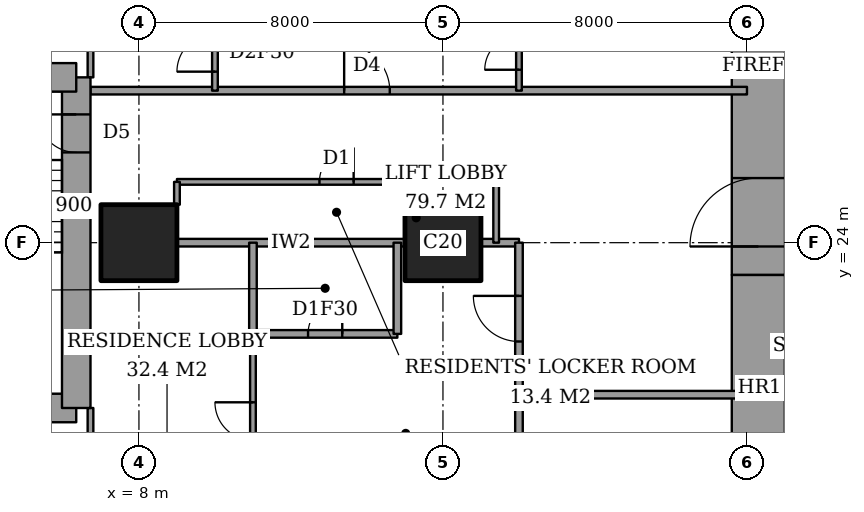
"""IFC4 building model, lengths in metres.
Left out: names, types, materials, properties, quantities, classifications, styles, units other than length and angle.
Written with IfcOpenShell. Run it as: python <this file> out.ifc"""

import sys

from ifc_helpers import new_model, si_unit, direction, frame, frame_2d, origin, origin_2d, place, context, subcontext, project, spatial, rectangle, extrude, element, fill, save


model = new_model("IFC4")
c1 = context("Model", 3, precision=1e-05, world=origin(), true_north=direction((0.0, 1.0)))
c2 = subcontext(c1, "Body", "Model", "MODEL_VIEW")
j1 = project(units=[si_unit("LENGTHUNIT", "METRE"), si_unit("PLANEANGLEUNIT", "RADIAN")], contexts=[c1])
p1 = place(None, origin())
s1 = spatial("IfcSite", under=j1, at=p1, CompositionType="ELEMENT")
p2 = place(p1, origin())
s2 = spatial("IfcBuilding", under=s1, at=p2, CompositionType="ELEMENT")
p3 = place(p2, frame((0.0, 0.0, 103.4)))
s3 = spatial("IfcBuildingStorey", under=s2, at=p3, CompositionType="ELEMENT", Elevation=103.4)
for number, where, z_axis, x_axis in (
    (1, (8.0, 24.0, 0.0), (0.0, 0.0, 1.0), (1.0, 0.0, 0.0)),
    (2, (16.0, 24.0, 0.0), (0.0, 0.0, 1.0), (1.0, 0.0, 0.0)),
):
    element("IfcColumn", number, at=place(p3, frame(where, z_axis=z_axis, x_axis=x_axis)), inside=s3, PredefinedType="COLUMN", context=c2, shape_type="SweptSolid", body=[
        extrude(rectangle(XDim=2.0, YDim=2.0, at=origin_2d()), origin(), (0.0, 0.0, 1.0), 3.6),
    ])
p4 = place(p3, frame((24.3, 13.0, 0.0), z_axis=(0.0, 0.0, 1.0), x_axis=(0.0, 1.0, 0.0)))
e3 = element("IfcWall", 3, at=p4, inside=s3, PredefinedType="SHEAR", context=c2, shape_type="SweptSolid", body=[
    extrude(rectangle(XDim=10.15, YDim=1.4, at=frame_2d((5.075, 0.0))), origin(), (0.0, 0.0, 1.0), 3.6),
])
p5 = place(p3, frame((24.3, 23.15, 0.0), z_axis=(0.0, 0.0, 1.0), x_axis=(0.0, 1.0, 0.0)))
e4 = element("IfcWall", 4, at=p5, inside=s3, PredefinedType="SHEAR", context=c2, shape_type="SweptSolid", body=[
    extrude(rectangle(XDim=11.85, YDim=1.4, at=frame_2d((5.925, 0.0))), origin(), (0.0, 0.0, 1.0), 3.6),
])
p6 = place(p5, frame((0.75, 0.0, 0.0)))
e5 = element("IfcOpeningElement", 5, at=p6, cuts=e4, PredefinedType="OPENING", context=c2, shape_type="SweptSolid", body=[
    extrude(rectangle(XDim=1.8, YDim=2.4, at=frame_2d((0.9, 1.2))), frame((0.0, 0.71, 0.0), z_axis=(0.0, -1.0, 0.0), x_axis=(1.0, 0.0, 0.0)), (0.0, 0.0, 1.0), 1.42),
])
p7 = place(p3, frame((1.9, 19.65, 0.0), z_axis=(0.0, 0.0, 1.0), x_axis=(1.0, 0.0, 0.0)))
e6 = element("IfcWall", 6, at=p7, inside=s3, PredefinedType="SHEAR", context=c2, shape_type="SweptSolid", body=[
    extrude(rectangle(XDim=4.45, YDim=0.75, at=frame_2d((2.225, 0.0))), origin(), (0.0, 0.0, 1.0), 3.6),
])
p8 = place(p3, frame((6.35, 19.65, 0.0), z_axis=(0.0, 0.0, 1.0), x_axis=(0.0, 1.0, 0.0)))
e7 = element("IfcWall", 7, at=p8, inside=s3, PredefinedType="SHEAR", context=c2, shape_type="SweptSolid", body=[
    extrude(rectangle(XDim=8.7, YDim=0.75, at=frame_2d((4.35, 0.0))), origin(), (0.0, 0.0, 1.0), 3.6),
])
p9 = place(p8, frame((6.725, 0.0, 0.0)))
e8 = element("IfcOpeningElement", 8, at=p9, cuts=e7, PredefinedType="OPENING", context=c2, shape_type="SweptSolid", body=[
    extrude(rectangle(XDim=1.0, YDim=2.1, at=frame_2d((0.5, 1.05))), frame((0.0, 0.385, 0.0), z_axis=(0.0, -1.0, 0.0), x_axis=(1.0, 0.0, 0.0)), (0.0, 0.0, 1.0), 0.77),
])
p10 = place(p3, frame((6.35, 28.35, 0.0), z_axis=(0.0, 0.0, 1.0), x_axis=(-1.0, 0.0, 0.0)))
e9 = element("IfcWall", 9, at=p10, inside=s3, PredefinedType="SHEAR", context=c2, shape_type="SweptSolid", body=[
    extrude(rectangle(XDim=4.45, YDim=0.75, at=frame_2d((2.225, 0.0))), origin(), (0.0, 0.0, 1.0), 3.6),
])
p11 = place(p3, frame((18.0, 20.0, 0.0), z_axis=(0.0, 0.0, 1.0), x_axis=(1.0, 0.0, 0.0)))
e10 = element("IfcWall", 10, at=p11, inside=s3, PredefinedType="PARTITIONING", context=c2, shape_type="SweptSolid", body=[
    extrude(rectangle(XDim=6.0, YDim=0.2, at=frame_2d((3.0, 0.0))), origin(), (0.0, 0.0, 1.0), 3.35),
])
p12 = place(p3, frame((11.0, 21.6, 0.0), z_axis=(0.0, 0.0, 1.0), x_axis=(1.0, 0.0, 0.0)))
e11 = element("IfcWall", 11, at=p12, inside=s3, PredefinedType="PARTITIONING", context=c2, shape_type="SweptSolid", body=[
    extrude(rectangle(XDim=3.8, YDim=0.2, at=frame_2d((1.9, 0.0))), origin(), (0.0, 0.0, 1.0), 3.35),
])
p13 = place(p12, frame((1.45, 0.0, 0.0)))
e12 = element("IfcOpeningElement", 12, at=p13, cuts=e11, PredefinedType="OPENING", context=c2, shape_type="SweptSolid", body=[
    extrude(rectangle(XDim=0.9, YDim=2.1, at=frame_2d((0.45, 1.05))), frame((0.0, 0.11, 0.0), z_axis=(0.0, -1.0, 0.0), x_axis=(1.0, 0.0, 0.0)), (0.0, 0.0, 1.0), 0.22),
])
p14 = place(p3, frame((9.0, 24.0, 0.0), z_axis=(0.0, 0.0, 1.0), x_axis=(1.0, 0.0, 0.0)))
e13 = element("IfcWall", 13, at=p14, inside=s3, PredefinedType="PARTITIONING", context=c2, shape_type="SweptSolid", body=[
    extrude(rectangle(XDim=6.0, YDim=0.2, at=frame_2d((3.0, 0.0))), origin(), (0.0, 0.0, 1.0), 3.35),
])
p15 = place(p3, frame((17.0, 24.0, 0.0), z_axis=(0.0, 0.0, 1.0), x_axis=(1.0, 0.0, 0.0)))
e14 = element("IfcWall", 14, at=p15, inside=s3, PredefinedType="PARTITIONING", context=c2, shape_type="SweptSolid", body=[
    extrude(rectangle(XDim=1.0, YDim=0.2, at=frame_2d((0.5, 0.0))), origin(), (0.0, 0.0, 1.0), 3.35),
])
p16 = place(p3, frame((9.0, 25.6, 0.0), z_axis=(0.0, 0.0, 1.0), x_axis=(1.0, 0.0, 0.0)))
e15 = element("IfcWall", 15, at=p16, inside=s3, PredefinedType="PARTITIONING", context=c2, shape_type="SweptSolid", body=[
    extrude(rectangle(XDim=8.4, YDim=0.15, at=frame_2d((4.2, 0.0))), origin(), (0.0, 0.0, 1.0), 3.35),
])
p17 = place(p16, frame((3.75, 0.0, 0.0)))
e16 = element("IfcOpeningElement", 16, at=p17, cuts=e15, PredefinedType="OPENING", context=c2, shape_type="SweptSolid", body=[
    extrude(rectangle(XDim=0.9, YDim=2.1, at=frame_2d((0.45, 1.05))), frame((0.0, 0.085, 0.0), z_axis=(0.0, -1.0, 0.0), x_axis=(1.0, 0.0, 0.0)), (0.0, 0.0, 1.0), 0.17),
])
p18 = place(p3, frame((6.725, 28.0, 0.0), z_axis=(0.0, 0.0, 1.0), x_axis=(1.0, 0.0, 0.0)))
e17 = element("IfcWall", 17, at=p18, inside=s3, PredefinedType="PARTITIONING", context=c2, shape_type="SweptSolid", body=[
    extrude(rectangle(XDim=17.275, YDim=0.2, at=frame_2d((8.637, 0.0))), origin(), (0.0, 0.0, 1.0), 3.35),
])
p19 = place(p18, frame((6.675, 0.0, 0.0)))
e18 = element("IfcOpeningElement", 18, at=p19, cuts=e17, PredefinedType="OPENING", context=c2, shape_type="SweptSolid", body=[
    extrude(rectangle(XDim=1.2, YDim=2.4, at=frame_2d((0.6, 1.2))), frame((0.0, 0.11, 0.0), z_axis=(0.0, -1.0, 0.0), x_axis=(1.0, 0.0, 0.0)), (0.0, 0.0, 1.0), 0.22),
])
p20 = place(p3, frame((6.725, 17.2, 0.0), z_axis=(0.0, 0.0, 1.0), x_axis=(0.0, 1.0, 0.0)))
e19 = element("IfcWall", 19, at=p20, inside=s3, PredefinedType="PARTITIONING", context=c2, shape_type="SweptSolid", body=[
    extrude(rectangle(XDim=2.45, YDim=0.15, at=frame_2d((1.225, 0.0))), origin(), (0.0, 0.0, 1.0), 3.35),
])
p21 = place(p20, frame((0.587, 0.0, 0.0)))
e20 = element("IfcOpeningElement", 20, at=p21, cuts=e19, PredefinedType="OPENING", context=c2, shape_type="SweptSolid", body=[
    extrude(rectangle(XDim=0.9, YDim=2.1, at=frame_2d((0.45, 1.05))), frame((0.0, 0.085, 0.0), z_axis=(0.0, -1.0, 0.0), x_axis=(1.0, 0.0, 0.0)), (0.0, 0.0, 1.0), 0.17),
])
p22 = place(p3, frame((6.725, 28.35, 0.0), z_axis=(0.0, 0.0, 1.0), x_axis=(0.0, 1.0, 0.0)))
e21 = element("IfcWall", 21, at=p22, inside=s3, PredefinedType="PARTITIONING", context=c2, shape_type="SweptSolid", body=[
    extrude(rectangle(XDim=2.45, YDim=0.15, at=frame_2d((1.225, 0.0))), origin(), (0.0, 0.0, 1.0), 3.35),
])
p23 = place(p22, frame((0.913, 0.0, 0.0)))
e22 = element("IfcOpeningElement", 22, at=p23, cuts=e21, PredefinedType="OPENING", context=c2, shape_type="SweptSolid", body=[
    extrude(rectangle(XDim=1.0, YDim=2.1, at=frame_2d((0.5, 1.05))), frame((0.0, 0.085, 0.0), z_axis=(0.0, -1.0, 0.0), x_axis=(1.0, 0.0, 0.0)), (0.0, 0.0, 1.0), 0.17),
])
p24 = place(p3, frame((9.0, 25.0, 0.0), z_axis=(0.0, 0.0, 1.0), x_axis=(0.0, 1.0, 0.0)))
e23 = element("IfcWall", 23, at=p24, inside=s3, PredefinedType="PARTITIONING", context=c2, shape_type="SweptSolid", body=[
    extrude(rectangle(XDim=0.6, YDim=0.15, at=frame_2d((0.3, 0.0))), origin(), (0.0, 0.0, 1.0), 3.35),
])
p25 = place(p3, frame((10.0, 28.0, 0.0), z_axis=(0.0, 0.0, 1.0), x_axis=(0.0, 1.0, 0.0)))
e24 = element("IfcWall", 24, at=p25, inside=s3, PredefinedType="PARTITIONING", context=c2, shape_type="SweptSolid", body=[
    extrude(rectangle(XDim=9.4, YDim=0.15, at=frame_2d((4.7, 0.0))), origin(), (0.0, 0.0, 1.0), 3.35),
])
p26 = place(p25, frame((0.5, 0.0, 0.0)))
e25 = element("IfcOpeningElement", 25, at=p26, cuts=e24, PredefinedType="OPENING", context=c2, shape_type="SweptSolid", body=[
    extrude(rectangle(XDim=1.0, YDim=2.1, at=frame_2d((0.5, 1.05))), frame((0.0, 0.085, 0.0), z_axis=(0.0, -1.0, 0.0), x_axis=(1.0, 0.0, 0.0)), (0.0, 0.0, 1.0), 0.17),
])
p27 = place(p3, frame((11.0, 21.6, 0.0), z_axis=(0.0, 0.0, 1.0), x_axis=(0.0, 1.0, 0.0)))
e26 = element("IfcWall", 26, at=p27, inside=s3, PredefinedType="PARTITIONING", context=c2, shape_type="SweptSolid", body=[
    extrude(rectangle(XDim=2.4, YDim=0.2, at=frame_2d((1.2, 0.0))), origin(), (0.0, 0.0, 1.0), 3.35),
])
p28 = place(p3, frame((11.0, 10.8, 0.0), z_axis=(0.0, 0.0, 1.0), x_axis=(0.0, 1.0, 0.0)))
e27 = element("IfcWall", 27, at=p28, inside=s3, PredefinedType="PARTITIONING", context=c2, shape_type="SweptSolid", body=[
    extrude(rectangle(XDim=10.8, YDim=0.15, at=frame_2d((5.4, 0.0))), origin(), (0.0, 0.0, 1.0), 3.35),
])
p29 = place(p28, frame((8.0, 0.0, 0.0)))
e28 = element("IfcOpeningElement", 28, at=p29, cuts=e27, PredefinedType="OPENING", context=c2, shape_type="SweptSolid", body=[
    extrude(rectangle(XDim=1.0, YDim=2.1, at=frame_2d((0.5, 1.05))), frame((0.0, 0.085, 0.0), z_axis=(0.0, -1.0, 0.0), x_axis=(1.0, 0.0, 0.0)), (0.0, 0.0, 1.0), 0.17),
])
p30 = place(p3, frame((14.8, 21.6, 0.0), z_axis=(0.0, 0.0, 1.0), x_axis=(0.0, 1.0, 0.0)))
e29 = element("IfcWall", 29, at=p30, inside=s3, PredefinedType="PARTITIONING", context=c2, shape_type="SweptSolid", body=[
    extrude(rectangle(XDim=2.4, YDim=0.2, at=frame_2d((1.2, 0.0))), origin(), (0.0, 0.0, 1.0), 3.35),
])
p31 = place(p3, frame((17.4, 24.0, 0.0), z_axis=(0.0, 0.0, 1.0), x_axis=(0.0, 1.0, 0.0)))
e30 = element("IfcWall", 30, at=p31, inside=s3, PredefinedType="PARTITIONING", context=c2, shape_type="SweptSolid", body=[
    extrude(rectangle(XDim=1.6, YDim=0.15, at=frame_2d((0.8, 0.0))), origin(), (0.0, 0.0, 1.0), 3.35),
])
p32 = place(p3, frame((18.0, 17.0, 0.0), z_axis=(0.0, 0.0, 1.0), x_axis=(0.0, 1.0, 0.0)))
e31 = element("IfcWall", 31, at=p32, inside=s3, PredefinedType="PARTITIONING", context=c2, shape_type="SweptSolid", body=[
    extrude(rectangle(XDim=7.0, YDim=0.2, at=frame_2d((3.5, 0.0))), origin(), (0.0, 0.0, 1.0), 3.35),
])
p33 = place(p32, frame((4.4, 0.0, 0.0)))
e32 = element("IfcOpeningElement", 32, at=p33, cuts=e31, PredefinedType="OPENING", context=c2, shape_type="SweptSolid", body=[
    extrude(rectangle(XDim=1.2, YDim=2.4, at=frame_2d((0.6, 1.2))), frame((0.0, 0.11, 0.0), z_axis=(0.0, -1.0, 0.0), x_axis=(1.0, 0.0, 0.0)), (0.0, 0.0, 1.0), 0.22),
])
p34 = place(p32, frame((1.05, 0.0, 0.0)))
e33 = element("IfcOpeningElement", 33, at=p34, cuts=e31, PredefinedType="OPENING", context=c2, shape_type="SweptSolid", body=[
    extrude(rectangle(XDim=0.9, YDim=2.1, at=frame_2d((0.45, 1.05))), frame((0.0, 0.11, 0.0), z_axis=(0.0, -1.0, 0.0), x_axis=(1.0, 0.0, 0.0)), (0.0, 0.0, 1.0), 0.22),
])
p35 = place(p3, frame((18.0, 28.0, 0.0), z_axis=(0.0, 0.0, 1.0), x_axis=(0.0, 1.0, 0.0)))
e34 = element("IfcWall", 34, at=p35, inside=s3, PredefinedType="PARTITIONING", context=c2, shape_type="SweptSolid", body=[
    extrude(rectangle(XDim=9.4, YDim=0.15, at=frame_2d((4.7, 0.0))), origin(), (0.0, 0.0, 1.0), 3.35),
])
p36 = place(p35, frame((0.55, 0.0, 0.0)))
e35 = element("IfcOpeningElement", 35, at=p36, cuts=e34, PredefinedType="OPENING", context=c2, shape_type="SweptSolid", body=[
    extrude(rectangle(XDim=0.9, YDim=2.1, at=frame_2d((0.45, 1.05))), frame((0.0, 0.085, 0.0), z_axis=(0.0, -1.0, 0.0), x_axis=(1.0, 0.0, 0.0)), (0.0, 0.0, 1.0), 0.17),
])
p37 = place(p29, origin())
e36 = element("IfcDoor", 36, at=p37, inside=s3, OperationType="SINGLE_SWING_LEFT", PredefinedType="DOOR", context=c2, shape_type="SweptSolid", body=[
    extrude(rectangle(XDim=1.0, YDim=2.1, at=frame_2d((0.5, 1.05))), frame((0.0, 0.025, 0.0), z_axis=(0.0, -1.0, 0.0), x_axis=(1.0, 0.0, 0.0)), (0.0, 0.0, 1.0), 0.05),
])
fill(e28, e36)
p38 = place(p13, origin())
e37 = element("IfcDoor", 37, at=p38, inside=s3, OperationType="SINGLE_SWING_LEFT", PredefinedType="DOOR", context=c2, shape_type="SweptSolid", body=[
    extrude(rectangle(XDim=0.9, YDim=2.1, at=frame_2d((0.45, 1.05))), frame((0.0, 0.025, 0.0), z_axis=(0.0, -1.0, 0.0), x_axis=(1.0, 0.0, 0.0)), (0.0, 0.0, 1.0), 0.05),
])
fill(e12, e37)
p39 = place(p33, origin())
e38 = element("IfcDoor", 38, at=p39, inside=s3, OperationType="SINGLE_SWING_LEFT", PredefinedType="DOOR", context=c2, shape_type="SweptSolid", body=[
    extrude(rectangle(XDim=1.2, YDim=2.4, at=frame_2d((0.6, 1.2))), frame((0.0, 0.025, 0.0), z_axis=(0.0, -1.0, 0.0), x_axis=(1.0, 0.0, 0.0)), (0.0, 0.0, 1.0), 0.05),
])
fill(e32, e38)
p40 = place(p26, origin())
e39 = element("IfcDoor", 39, at=p40, inside=s3, OperationType="SINGLE_SWING_RIGHT", PredefinedType="DOOR", context=c2, shape_type="SweptSolid", body=[
    extrude(rectangle(XDim=1.0, YDim=2.1, at=frame_2d((0.5, 1.05))), frame((0.0, 0.025, 0.0), z_axis=(0.0, -1.0, 0.0), x_axis=(1.0, 0.0, 0.0)), (0.0, 0.0, 1.0), 0.05),
])
fill(e25, e39)
p41 = place(p19, origin())
e40 = element("IfcDoor", 40, at=p41, inside=s3, OperationType="SINGLE_SWING_RIGHT", PredefinedType="DOOR", context=c2, shape_type="SweptSolid", body=[
    extrude(rectangle(XDim=1.2, YDim=2.4, at=frame_2d((0.6, 1.2))), frame((0.0, 0.025, 0.0), z_axis=(0.0, -1.0, 0.0), x_axis=(1.0, 0.0, 0.0)), (0.0, 0.0, 1.0), 0.05),
])
fill(e18, e40)
p42 = place(p36, origin())
e41 = element("IfcDoor", 41, at=p42, inside=s3, OperationType="SINGLE_SWING_RIGHT", PredefinedType="DOOR", context=c2, shape_type="SweptSolid", body=[
    extrude(rectangle(XDim=0.9, YDim=2.1, at=frame_2d((0.45, 1.05))), frame((0.0, 0.025, 0.0), z_axis=(0.0, -1.0, 0.0), x_axis=(1.0, 0.0, 0.0)), (0.0, 0.0, 1.0), 0.05),
])
fill(e35, e41)
p43 = place(p17, origin())
e42 = element("IfcDoor", 42, at=p43, inside=s3, OperationType="SINGLE_SWING_LEFT", PredefinedType="DOOR", context=c2, shape_type="SweptSolid", body=[
    extrude(rectangle(XDim=0.9, YDim=2.1, at=frame_2d((0.45, 1.05))), frame((0.0, 0.025, 0.0), z_axis=(0.0, -1.0, 0.0), x_axis=(1.0, 0.0, 0.0)), (0.0, 0.0, 1.0), 0.05),
])
fill(e16, e42)
p44 = place(p6, origin())
e43 = element("IfcDoor", 43, at=p44, inside=s3, OperationType="DOUBLE_DOOR_DOUBLE_SWING", PredefinedType="DOOR", context=c2, shape_type="SweptSolid", body=[
    extrude(rectangle(XDim=1.8, YDim=2.4, at=frame_2d((0.9, 1.2))), frame((0.0, 0.025, 0.0), z_axis=(0.0, -1.0, 0.0), x_axis=(1.0, 0.0, 0.0)), (0.0, 0.0, 1.0), 0.05),
])
fill(e5, e43)
p45 = place(p9, origin())
e44 = element("IfcDoor", 44, at=p45, inside=s3, OperationType="SINGLE_SWING_LEFT", PredefinedType="DOOR", context=c2, shape_type="SweptSolid", body=[
    extrude(rectangle(XDim=1.0, YDim=2.1, at=frame_2d((0.5, 1.05))), frame((0.0, 0.025, 0.0), z_axis=(0.0, -1.0, 0.0), x_axis=(1.0, 0.0, 0.0)), (0.0, 0.0, 1.0), 0.05),
])
fill(e8, e44)
save(model, sys.argv[1])
